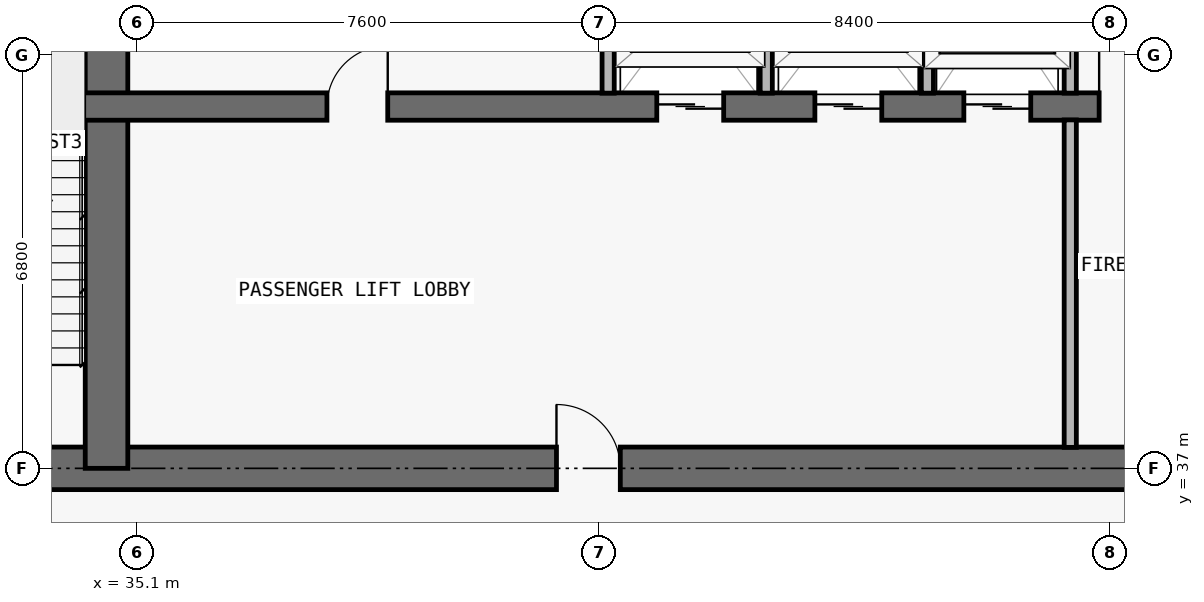
"""IFC4 building model, lengths in metres.
Left out: names, types, materials, properties, quantities, classifications, styles, units other than length and angle.
Written with IfcOpenShell. Run it as: python <this file> out.ifc"""

import sys

from ifc_helpers import new_model, si_unit, direction, frame, frame_2d, origin, place, context, subcontext, project, spatial, rectangle, extrude, element, fill, save


model = new_model("IFC4")
c1 = context("Model", 3, precision=1e-05, world=origin(), true_north=direction((0.0, 1.0)))
c2 = subcontext(c1, "Body", "Model", "MODEL_VIEW")
j1 = project(units=[si_unit("LENGTHUNIT", "METRE"), si_unit("PLANEANGLEUNIT", "RADIAN")], contexts=[c1])
p1 = place(None, origin())
s1 = spatial("IfcSite", under=j1, at=p1, CompositionType="ELEMENT")
p2 = place(p1, origin())
s2 = spatial("IfcBuilding", under=s1, at=p2, CompositionType="ELEMENT")
p3 = place(p2, frame((0.0, 0.0, 183.6)))
s3 = spatial("IfcBuildingStorey", under=s2, at=p3, CompositionType="ELEMENT", Elevation=183.6)
p4 = place(p3, frame((17.95, 37.0, 0.0), z_axis=(0.0, 0.0, 1.0), x_axis=(1.0, 0.0, 0.0)))
e1 = element("IfcWall", 1, at=p4, inside=s3, PredefinedType="SHEAR", context=c2, shape_type="SweptSolid", body=[
    extrude(rectangle(XDim=41.9, YDim=0.7, at=frame_2d((20.95, 0.0))), origin(), (0.0, 0.0, 1.0), 4.55),
])
p5 = place(p4, frame((14.35, 0.0, 0.0)))
e2 = element("IfcOpeningElement", 2, at=p5, cuts=e1, PredefinedType="OPENING", context=c2, shape_type="SweptSolid", body=[
    extrude(rectangle(XDim=1.1, YDim=2.15, at=frame_2d((0.55, 1.075))), frame((0.0, 0.36, 0.0), z_axis=(0.0, -1.0, 0.0), x_axis=(1.0, 0.0, 0.0)), (0.0, 0.0, 1.0), 0.72),
])
p6 = place(p4, frame((6.2, 0.0, 0.0)))
e3 = element("IfcOpeningElement", 3, at=p6, cuts=e1, PredefinedType="OPENING", context=c2, shape_type="SweptSolid", body=[
    extrude(rectangle(XDim=1.05, YDim=2.15, at=frame_2d((0.525, 1.075))), frame((0.0, 0.36, 0.0), z_axis=(0.0, -1.0, 0.0), x_axis=(1.0, 0.0, 0.0)), (0.0, 0.0, 1.0), 0.72),
])
p7 = place(p4, frame((34.7, 0.0, 0.0)))
e4 = element("IfcOpeningElement", 4, at=p7, cuts=e1, PredefinedType="OPENING", context=c2, shape_type="SweptSolid", body=[
    extrude(rectangle(XDim=1.05, YDim=2.15, at=frame_2d((0.525, 1.075))), frame((0.0, 0.36, 0.0), z_axis=(0.0, -1.0, 0.0), x_axis=(1.0, 0.0, 0.0)), (0.0, 0.0, 1.0), 0.72),
])
p8 = place(p4, frame((10.812, 0.0, 0.0)))
e5 = element("IfcOpeningElement", 5, at=p8, cuts=e1, PredefinedType="OPENING", context=c2, shape_type="SweptSolid", body=[
    extrude(rectangle(XDim=1.05, YDim=2.15, at=frame_2d((0.525, 1.075))), frame((0.0, 0.36, 0.0), z_axis=(0.0, -1.0, 0.0), x_axis=(1.0, 0.0, 0.0)), (0.0, 0.0, 1.0), 0.72),
])
p9 = place(p4, frame((24.05, 0.0, 0.0)))
e6 = element("IfcOpeningElement", 6, at=p9, cuts=e1, PredefinedType="OPENING", context=c2, shape_type="SweptSolid", body=[
    extrude(rectangle(XDim=1.05, YDim=2.15, at=frame_2d((0.525, 1.075))), frame((0.0, 0.36, 0.0), z_axis=(0.0, -1.0, 0.0), x_axis=(1.0, 0.0, 0.0)), (0.0, 0.0, 1.0), 0.72),
])
p10 = place(p3, frame((34.6, 37.0, 0.0), z_axis=(0.0, 0.0, 1.0), x_axis=(0.0, 1.0, 0.0)))
e7 = element("IfcWall", 7, at=p10, inside=s3, PredefinedType="SHEAR", context=c2, shape_type="SweptSolid", body=[
    extrude(rectangle(XDim=9.575, YDim=0.7, at=frame_2d((4.788, 0.0))), origin(), (0.0, 0.0, 1.0), 4.55),
])
p11 = place(p3, frame((22.25, 42.95, 0.0), z_axis=(0.0, 0.0, 1.0), x_axis=(1.0, 0.0, 0.0)))
e8 = element("IfcWall", 8, at=p11, inside=s3, PredefinedType="SHEAR", context=c2, shape_type="SweptSolid", body=[
    extrude(rectangle(XDim=33.3, YDim=0.45, at=frame_2d((16.65, 0.0))), origin(), (0.0, 0.0, 1.0), 4.55),
])
p12 = place(p11, frame((1.05, 0.0, 0.0)))
e9 = element("IfcOpeningElement", 9, at=p12, cuts=e8, PredefinedType="OPENING", context=c2, shape_type="SweptSolid", body=[
    extrude(rectangle(XDim=1.2, YDim=2.2, at=frame_2d((0.6, 1.1))), frame((0.0, 0.235, 0.0), z_axis=(0.0, -1.0, 0.0), x_axis=(1.0, 0.0, 0.0)), (0.0, 0.0, 1.0), 0.47),
])
p13 = place(p11, frame((31.05, 0.0, 0.0)))
e10 = element("IfcOpeningElement", 10, at=p13, cuts=e8, PredefinedType="OPENING", context=c2, shape_type="SweptSolid", body=[
    extrude(rectangle(XDim=1.2, YDim=2.2, at=frame_2d((0.6, 1.1))), frame((0.0, 0.235, 0.0), z_axis=(0.0, -1.0, 0.0), x_axis=(1.0, 0.0, 0.0)), (0.0, 0.0, 1.0), 0.47),
])
p14 = place(p11, frame((21.4, 0.0, 0.0)))
e11 = element("IfcOpeningElement", 11, at=p14, cuts=e8, PredefinedType="OPENING", context=c2, shape_type="SweptSolid", body=[
    extrude(rectangle(XDim=1.1, YDim=2.2, at=frame_2d((0.55, 1.1))), frame((0.0, 0.235, 0.0), z_axis=(0.0, -1.0, 0.0), x_axis=(1.0, 0.0, 0.0)), (0.0, 0.0, 1.0), 0.47),
])
p15 = place(p11, frame((24.0, 0.0, 0.0)))
e12 = element("IfcOpeningElement", 12, at=p15, cuts=e8, PredefinedType="OPENING", context=c2, shape_type="SweptSolid", body=[
    extrude(rectangle(XDim=1.1, YDim=2.2, at=frame_2d((0.55, 1.1))), frame((0.0, 0.235, 0.0), z_axis=(0.0, -1.0, 0.0), x_axis=(1.0, 0.0, 0.0)), (0.0, 0.0, 1.0), 0.47),
])
p16 = place(p11, frame((26.45, 0.0, 0.0)))
e13 = element("IfcOpeningElement", 13, at=p16, cuts=e8, PredefinedType="OPENING", context=c2, shape_type="SweptSolid", body=[
    extrude(rectangle(XDim=1.1, YDim=2.2, at=frame_2d((0.55, 1.1))), frame((0.0, 0.235, 0.0), z_axis=(0.0, -1.0, 0.0), x_axis=(1.0, 0.0, 0.0)), (0.0, 0.0, 1.0), 0.47),
])
p17 = place(p11, frame((5.95, 0.0, 0.0)))
e14 = element("IfcOpeningElement", 14, at=p17, cuts=e8, PredefinedType="OPENING", context=c2, shape_type="SweptSolid", body=[
    extrude(rectangle(XDim=1.1, YDim=2.2, at=frame_2d((0.55, 1.1))), frame((0.0, 0.235, 0.0), z_axis=(0.0, -1.0, 0.0), x_axis=(1.0, 0.0, 0.0)), (0.0, 0.0, 1.0), 0.47),
])
p18 = place(p11, frame((3.625, 0.0, 0.0)))
e15 = element("IfcOpeningElement", 15, at=p18, cuts=e8, PredefinedType="OPENING", context=c2, shape_type="SweptSolid", body=[
    extrude(rectangle(XDim=1.05, YDim=2.15, at=frame_2d((0.525, 1.075))), frame((0.0, 0.235, 0.0), z_axis=(0.0, -1.0, 0.0), x_axis=(1.0, 0.0, 0.0)), (0.0, 0.0, 1.0), 0.47),
])
p19 = place(p11, frame((28.675, 0.0, 0.0)))
e16 = element("IfcOpeningElement", 16, at=p19, cuts=e8, PredefinedType="OPENING", context=c2, shape_type="SweptSolid", body=[
    extrude(rectangle(XDim=1.05, YDim=2.15, at=frame_2d((0.525, 1.075))), frame((0.0, 0.235, 0.0), z_axis=(0.0, -1.0, 0.0), x_axis=(1.0, 0.0, 0.0)), (0.0, 0.0, 1.0), 0.47),
])
p20 = place(p11, frame((15.975, 0.0, 0.0)))
e17 = element("IfcOpeningElement", 17, at=p20, cuts=e8, PredefinedType="OPENING", context=c2, shape_type="SweptSolid", body=[
    extrude(rectangle(XDim=1.0, YDim=2.2, at=frame_2d((0.5, 1.1))), frame((0.0, 0.235, 0.0), z_axis=(0.0, -1.0, 0.0), x_axis=(1.0, 0.0, 0.0)), (0.0, 0.0, 1.0), 0.47),
])
for number, where, z_axis, x_axis in (
    (18, (42.85, 43.17, 0.0), (0.0, 0.0, 1.0), (0.0, 1.0, 0.0)),
    (19, (45.45, 43.17, 0.0), (0.0, 0.0, 1.0), (0.0, 1.0, 0.0)),
    (20, (48.1, 43.17, 0.0), (0.0, 0.0, 1.0), (0.0, 1.0, 0.0)),
):
    element("IfcWall", number, at=place(p3, frame(where, z_axis=z_axis, x_axis=x_axis)), inside=s3, PredefinedType="PARTITIONING", context=c2, shape_type="SweptSolid", body=[
        extrude(rectangle(XDim=3.185, YDim=0.2, at=frame_2d((1.593, 0.0))), origin(), (0.0, 0.0, 1.0), 4.55),
    ])
p21 = place(p3, frame((50.45, 37.345, 0.0), z_axis=(0.0, 0.0, 1.0), x_axis=(0.0, 1.0, 0.0)))
e21 = element("IfcWall", 21, at=p21, inside=s3, PredefinedType="PARTITIONING", context=c2, shape_type="SweptSolid", body=[
    extrude(rectangle(XDim=5.385, YDim=0.2, at=frame_2d((2.692, 0.0))), origin(), (0.0, 0.0, 1.0), 4.55),
])
p22 = place(p3, frame((50.45, 43.17, 0.0), z_axis=(0.0, 0.0, 1.0), x_axis=(0.0, 1.0, 0.0)))
e22 = element("IfcWall", 22, at=p22, inside=s3, PredefinedType="PARTITIONING", context=c2, shape_type="SweptSolid", body=[
    extrude(rectangle(XDim=3.185, YDim=0.2, at=frame_2d((1.593, 0.0))), origin(), (0.0, 0.0, 1.0), 4.55),
])
p23 = place(p14, origin())
e23 = element("IfcDoor", 23, at=p23, inside=s3, OperationType="DOUBLE_DOOR_SLIDING", PredefinedType="DOOR", context=c2, shape_type="SweptSolid", body=[
    extrude(rectangle(XDim=1.1, YDim=2.2, at=frame_2d((0.55, 1.1))), frame((0.0, 0.025, 0.0), z_axis=(0.0, -1.0, 0.0), x_axis=(1.0, 0.0, 0.0)), (0.0, 0.0, 1.0), 0.05),
])
fill(e11, e23)
p24 = place(p15, origin())
e24 = element("IfcDoor", 24, at=p24, inside=s3, OperationType="DOUBLE_DOOR_SLIDING", PredefinedType="DOOR", context=c2, shape_type="SweptSolid", body=[
    extrude(rectangle(XDim=1.1, YDim=2.2, at=frame_2d((0.55, 1.1))), frame((0.0, 0.025, 0.0), z_axis=(0.0, -1.0, 0.0), x_axis=(1.0, 0.0, 0.0)), (0.0, 0.0, 1.0), 0.05),
])
fill(e12, e24)
p25 = place(p16, origin())
e25 = element("IfcDoor", 25, at=p25, inside=s3, OperationType="DOUBLE_DOOR_SLIDING", PredefinedType="DOOR", context=c2, shape_type="SweptSolid", body=[
    extrude(rectangle(XDim=1.1, YDim=2.2, at=frame_2d((0.55, 1.1))), frame((0.0, 0.025, 0.0), z_axis=(0.0, -1.0, 0.0), x_axis=(1.0, 0.0, 0.0)), (0.0, 0.0, 1.0), 0.05),
])
fill(e13, e25)
p26 = place(p19, origin())
e26 = element("IfcDoor", 26, at=p26, inside=s3, OperationType="SINGLE_SWING_LEFT", PredefinedType="DOOR", context=c2, shape_type="SweptSolid", body=[
    extrude(rectangle(XDim=1.05, YDim=2.15, at=frame_2d((0.525, 1.075))), frame((0.0, 0.025, 0.0), z_axis=(0.0, -1.0, 0.0), x_axis=(1.0, 0.0, 0.0)), (0.0, 0.0, 1.0), 0.05),
])
fill(e16, e26)
p27 = place(p9, origin())
e27 = element("IfcDoor", 27, at=p27, inside=s3, OperationType="SINGLE_SWING_LEFT", PredefinedType="DOOR", context=c2, shape_type="SweptSolid", body=[
    extrude(rectangle(XDim=1.05, YDim=2.15, at=frame_2d((0.525, 1.075))), frame((0.0, 0.025, 0.0), z_axis=(0.0, -1.0, 0.0), x_axis=(1.0, 0.0, 0.0)), (0.0, 0.0, 1.0), 0.05),
])
fill(e6, e27)
p28 = place(p20, origin())
e28 = element("IfcDoor", 28, at=p28, inside=s3, OperationType="SINGLE_SWING_RIGHT", PredefinedType="DOOR", context=c2, shape_type="SweptSolid", body=[
    extrude(rectangle(XDim=1.0, YDim=2.2, at=frame_2d((0.5, 1.1))), frame((0.0, 0.025, 0.0), z_axis=(0.0, -1.0, 0.0), x_axis=(1.0, 0.0, 0.0)), (0.0, 0.0, 1.0), 0.05),
])
fill(e17, e28)
save(model, sys.argv[1])
